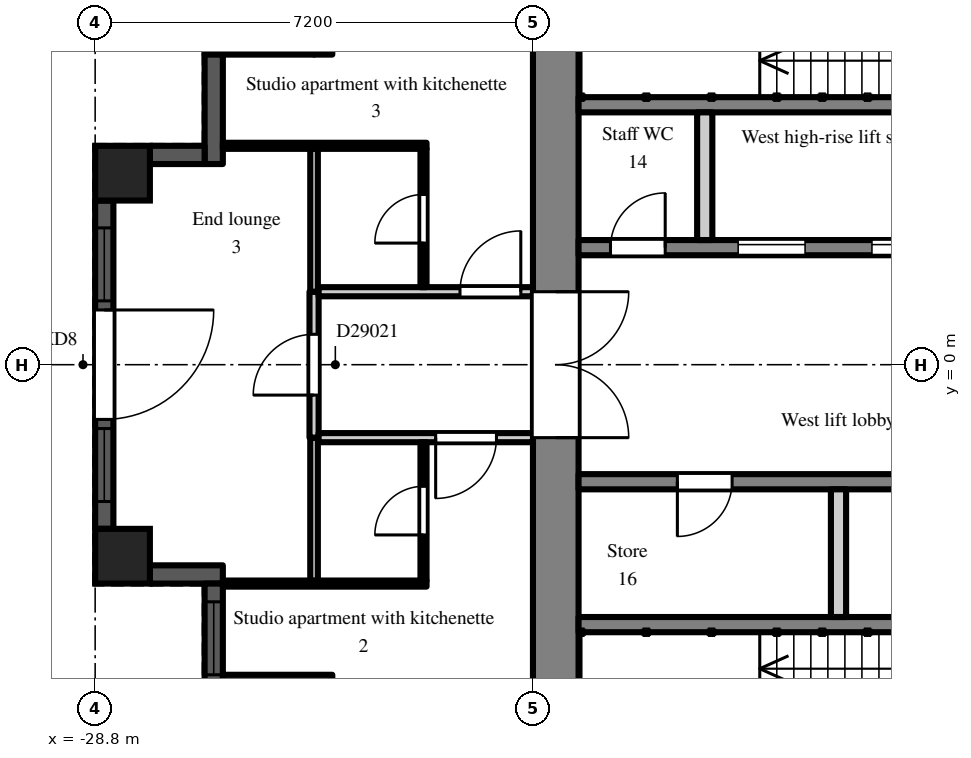
"""IFC4 building model, lengths in metres.
Left out: names, types, materials, properties, quantities, classifications, styles, units other than length and angle.
Written with IfcOpenShell. Run it as: python <this file> out.ifc"""

import sys

from ifc_helpers import new_model, si_unit, direction, frame, frame_2d, origin, origin_2d, place, context, subcontext, project, spatial, rectangle, extrude, element, fill, save


model = new_model("IFC4")
c1 = context("Model", 3, precision=1e-05, world=origin(), true_north=direction((0.0, 1.0)))
c2 = subcontext(c1, "Body", "Model", "MODEL_VIEW")
j1 = project(units=[si_unit("LENGTHUNIT", "METRE"), si_unit("PLANEANGLEUNIT", "RADIAN")], contexts=[c1])
p1 = place(None, origin())
s1 = spatial("IfcSite", under=j1, at=p1, CompositionType="ELEMENT")
p2 = place(p1, origin())
s2 = spatial("IfcBuilding", under=s1, at=p2, CompositionType="ELEMENT")
p3 = place(p2, frame((0.0, 0.0, 198.9)))
s3 = spatial("IfcBuildingStorey", under=s2, at=p3, CompositionType="ELEMENT", Elevation=198.9)
for number, where, z_axis, x_axis in (
    (1, (-28.35, -3.15, 0.0), (0.0, 0.0, 1.0), (1.0, 0.0, 0.0)),
    (2, (-28.35, 3.15, 0.0), (0.0, 0.0, 1.0), (1.0, 0.0, 0.0)),
):
    element("IfcColumn", number, at=place(p3, frame(where, z_axis=z_axis, x_axis=x_axis)), inside=s3, PredefinedType="COLUMN", context=c2, shape_type="SweptSolid", body=[
        extrude(rectangle(XDim=0.9, YDim=0.9, at=origin_2d()), origin(), (0.0, 0.0, 1.0), 3.0),
    ])
p4 = place(p3, frame((-25.05, 6.3, 0.0), z_axis=(0.0, 0.0, 1.0), x_axis=(0.0, -1.0, 0.0)))
e3 = element("IfcWall", 3, at=p4, inside=s3, PredefinedType="SOLIDWALL", context=c2, shape_type="SweptSolid", body=[
    extrude(rectangle(XDim=1.2, YDim=0.3, at=frame_2d((0.6, 0.0))), origin(), (0.0, 0.0, 1.0), 2.6),
])
p5 = place(p3, frame((-25.2, 5.25, 0.0), z_axis=(0.0, 0.0, 1.0), x_axis=(-1.0, 0.0, 0.0)))
e4 = element("IfcWall", 4, at=p5, inside=s3, PredefinedType="SOLIDWALL", context=c2, shape_type="SweptSolid", body=[
    extrude(rectangle(XDim=1.8, YDim=0.3, at=frame_2d((0.9, 0.0))), origin(), (0.0, 0.0, 1.0), 2.6),
])
p6 = place(p5, frame((0.3, 0.0, 0.2)))
e5 = element("IfcOpeningElement", 5, at=p6, cuts=e4, PredefinedType="OPENING", context=c2, shape_type="SweptSolid", body=[
    extrude(rectangle(XDim=1.2, YDim=1.85, at=frame_2d((0.6, 0.925))), frame((0.0, 0.16, 0.0), z_axis=(0.0, -1.0, 0.0), x_axis=(1.0, 0.0, 0.0)), (0.0, 0.0, 1.0), 0.32),
])
p7 = place(p3, frame((-26.85, 5.1, 0.0), z_axis=(0.0, 0.0, 1.0), x_axis=(0.0, -1.0, 0.0)))
e6 = element("IfcWall", 6, at=p7, inside=s3, PredefinedType="SOLIDWALL", context=c2, shape_type="SweptSolid", body=[
    extrude(rectangle(XDim=1.8, YDim=0.3, at=frame_2d((0.9, 0.0))), origin(), (0.0, 0.0, 1.0), 2.6),
])
p8 = place(p3, frame((-27.0, 3.45, 0.0), z_axis=(0.0, 0.0, 1.0), x_axis=(-1.0, 0.0, 0.0)))
e7 = element("IfcWall", 7, at=p8, inside=s3, PredefinedType="SOLIDWALL", context=c2, shape_type="SweptSolid", body=[
    extrude(rectangle(XDim=0.9, YDim=0.3, at=frame_2d((0.45, 0.0))), origin(), (0.0, 0.0, 1.0), 2.6),
])
p9 = place(p3, frame((-28.65, 2.7, 0.0), z_axis=(0.0, 0.0, 1.0), x_axis=(0.0, -1.0, 0.0)))
e8 = element("IfcWall", 8, at=p9, inside=s3, PredefinedType="SOLIDWALL", context=c2, shape_type="SweptSolid", body=[
    extrude(rectangle(XDim=5.4, YDim=0.3, at=frame_2d((2.7, 0.0))), origin(), (0.0, 0.0, 1.0), 2.3),
])
p10 = place(p9, frame((1.8, 0.0, 0.0)))
e9 = element("IfcOpeningElement", 9, at=p10, cuts=e8, PredefinedType="OPENING", context=c2, shape_type="SweptSolid", body=[
    extrude(rectangle(XDim=1.8, YDim=2.05, at=frame_2d((0.9, 1.025))), frame((0.0, 0.16, 0.0), z_axis=(0.0, -1.0, 0.0), x_axis=(1.0, 0.0, 0.0)), (0.0, 0.0, 1.0), 0.32),
])
p11 = place(p9, frame((0.45, 0.0, 0.2)))
e10 = element("IfcOpeningElement", 10, at=p11, cuts=e8, PredefinedType="OPENING", context=c2, shape_type="SweptSolid", body=[
    extrude(rectangle(XDim=1.2, YDim=1.85, at=frame_2d((0.6, 0.925))), frame((0.0, 0.16, 0.0), z_axis=(0.0, -1.0, 0.0), x_axis=(1.0, 0.0, 0.0)), (0.0, 0.0, 1.0), 0.32),
])
p12 = place(p9, frame((3.75, 0.0, 0.2)))
e11 = element("IfcOpeningElement", 11, at=p12, cuts=e8, PredefinedType="OPENING", context=c2, shape_type="SweptSolid", body=[
    extrude(rectangle(XDim=1.2, YDim=1.85, at=frame_2d((0.6, 0.925))), frame((0.0, 0.16, 0.0), z_axis=(0.0, -1.0, 0.0), x_axis=(1.0, 0.0, 0.0)), (0.0, 0.0, 1.0), 0.32),
])
p13 = place(p3, frame((-27.9, -3.45, 0.0), z_axis=(0.0, 0.0, 1.0), x_axis=(1.0, 0.0, 0.0)))
e12 = element("IfcWall", 12, at=p13, inside=s3, PredefinedType="SOLIDWALL", context=c2, shape_type="SweptSolid", body=[
    extrude(rectangle(XDim=1.2, YDim=0.3, at=frame_2d((0.6, 0.0))), origin(), (0.0, 0.0, 1.0), 2.6),
])
p14 = place(p3, frame((-26.85, -3.6, 0.0), z_axis=(0.0, 0.0, 1.0), x_axis=(0.0, -1.0, 0.0)))
e13 = element("IfcWall", 13, at=p14, inside=s3, PredefinedType="SOLIDWALL", context=c2, shape_type="SweptSolid", body=[
    extrude(rectangle(XDim=1.8, YDim=0.3, at=frame_2d((0.9, 0.0))), origin(), (0.0, 0.0, 1.0), 2.6),
])
p15 = place(p14, frame((0.3, 0.0, 0.2)))
e14 = element("IfcOpeningElement", 14, at=p15, cuts=e13, PredefinedType="OPENING", context=c2, shape_type="SweptSolid", body=[
    extrude(rectangle(XDim=1.2, YDim=1.85, at=frame_2d((0.6, 0.925))), frame((0.0, 0.16, 0.0), z_axis=(0.0, -1.0, 0.0), x_axis=(1.0, 0.0, 0.0)), (0.0, 0.0, 1.0), 0.32),
])
p16 = place(p3, frame((-26.7, -5.25, 0.0), z_axis=(0.0, 0.0, 1.0), x_axis=(1.0, 0.0, 0.0)))
e15 = element("IfcWall", 15, at=p16, inside=s3, PredefinedType="SOLIDWALL", context=c2, shape_type="SweptSolid", body=[
    extrude(rectangle(XDim=1.8, YDim=0.3, at=frame_2d((0.9, 0.0))), origin(), (0.0, 0.0, 1.0), 2.6),
])
p17 = place(p3, frame((-21.225, -7.2, 0.0), z_axis=(0.0, 0.0, 1.0), x_axis=(0.0, 1.0, 0.0)))
e16 = element("IfcWall", 16, at=p17, inside=s3, PredefinedType="SHEAR", context=c2, shape_type="SweptSolid", body=[
    extrude(rectangle(XDim=14.4, YDim=0.75, at=frame_2d((7.2, 0.0))), origin(), (0.0, 0.0, 1.0), 2.6),
])
p18 = place(p17, frame((6.0, 0.0, 0.0)))
e17 = element("IfcOpeningElement", 17, at=p18, cuts=e16, PredefinedType="OPENING", context=c2, shape_type="SweptSolid", body=[
    extrude(rectangle(XDim=2.4, YDim=2.2, at=frame_2d((1.2, 1.1))), frame((0.0, 0.385, 0.0), z_axis=(0.0, -1.0, 0.0), x_axis=(1.0, 0.0, 0.0)), (0.0, 0.0, 1.0), 0.77),
])
p19 = place(p3, frame((-7.9, 1.925, 0.0), z_axis=(0.0, 0.0, 1.0), x_axis=(-1.0, 0.0, 0.0)))
e18 = element("IfcWall", 18, at=p19, inside=s3, PredefinedType="SHEAR", context=c2, shape_type="SweptSolid", body=[
    extrude(rectangle(XDim=12.95, YDim=0.25, at=frame_2d((6.475, 0.0))), origin(), (0.0, 0.0, 1.0), 2.6),
])
p20 = place(p19, frame((4.825, 0.0, 0.0)))
e19 = element("IfcOpeningElement", 19, at=p20, cuts=e18, PredefinedType="OPENING", context=c2, shape_type="SweptSolid", body=[
    extrude(rectangle(XDim=1.1, YDim=2.1, at=frame_2d((0.55, 1.05))), frame((0.0, 0.135, 0.0), z_axis=(0.0, -1.0, 0.0), x_axis=(1.0, 0.0, 0.0)), (0.0, 0.0, 1.0), 0.27),
])
p21 = place(p19, frame((7.025, 0.0, 0.0)))
e20 = element("IfcOpeningElement", 20, at=p21, cuts=e18, PredefinedType="OPENING", context=c2, shape_type="SweptSolid", body=[
    extrude(rectangle(XDim=1.1, YDim=2.1, at=frame_2d((0.55, 1.05))), frame((0.0, 0.135, 0.0), z_axis=(0.0, -1.0, 0.0), x_axis=(1.0, 0.0, 0.0)), (0.0, 0.0, 1.0), 0.27),
])
p22 = place(p19, frame((9.225, 0.0, 0.0)))
e21 = element("IfcOpeningElement", 21, at=p22, cuts=e18, PredefinedType="OPENING", context=c2, shape_type="SweptSolid", body=[
    extrude(rectangle(XDim=1.1, YDim=2.1, at=frame_2d((0.55, 1.05))), frame((0.0, 0.135, 0.0), z_axis=(0.0, -1.0, 0.0), x_axis=(1.0, 0.0, 0.0)), (0.0, 0.0, 1.0), 0.27),
])
p23 = place(p19, frame((0.525, 0.0, 0.0)))
e22 = element("IfcOpeningElement", 22, at=p23, cuts=e18, PredefinedType="OPENING", context=c2, shape_type="SweptSolid", body=[
    extrude(rectangle(XDim=0.9, YDim=2.1, at=frame_2d((0.45, 1.05))), frame((0.0, 0.135, 0.0), z_axis=(0.0, -1.0, 0.0), x_axis=(1.0, 0.0, 0.0)), (0.0, 0.0, 1.0), 0.27),
])
p24 = place(p19, frame((2.625, 0.0, 0.0)))
e23 = element("IfcOpeningElement", 23, at=p24, cuts=e18, PredefinedType="OPENING", context=c2, shape_type="SweptSolid", body=[
    extrude(rectangle(XDim=1.1, YDim=2.1, at=frame_2d((0.55, 1.05))), frame((0.0, 0.135, 0.0), z_axis=(0.0, -1.0, 0.0), x_axis=(1.0, 0.0, 0.0)), (0.0, 0.0, 1.0), 0.27),
])
p25 = place(p19, frame((11.525, 0.0, 0.0)))
e24 = element("IfcOpeningElement", 24, at=p25, cuts=e18, PredefinedType="OPENING", context=c2, shape_type="SweptSolid", body=[
    extrude(rectangle(XDim=0.9, YDim=2.1, at=frame_2d((0.45, 1.05))), frame((0.0, 0.135, 0.0), z_axis=(0.0, -1.0, 0.0), x_axis=(1.0, 0.0, 0.0)), (0.0, 0.0, 1.0), 0.27),
])
p26 = place(p3, frame((-12.3, 4.275, 0.0), z_axis=(0.0, 0.0, 1.0), x_axis=(-1.0, 0.0, 0.0)))
e25 = element("IfcWall", 25, at=p26, inside=s3, PredefinedType="SHEAR", context=c2, shape_type="SweptSolid", body=[
    extrude(rectangle(XDim=8.55, YDim=0.25, at=frame_2d((4.275, 0.0))), origin(), (0.0, 0.0, 1.0), 2.6),
])
p27 = place(p3, frame((-18.775, 2.05, 0.0), z_axis=(0.0, 0.0, 1.0), x_axis=(0.0, 1.0, 0.0)))
e26 = element("IfcWall", 26, at=p27, inside=s3, PredefinedType="PARTITIONING", context=c2, shape_type="SweptSolid", body=[
    extrude(rectangle(XDim=2.1, YDim=0.25, at=frame_2d((1.05, 0.0))), origin(), (0.0, 0.0, 1.0), 2.6),
])
p28 = place(p3, frame((-7.9, -1.925, 0.0), z_axis=(0.0, 0.0, 1.0), x_axis=(-1.0, 0.0, 0.0)))
e27 = element("IfcWall", 27, at=p28, inside=s3, PredefinedType="SHEAR", context=c2, shape_type="SweptSolid", body=[
    extrude(rectangle(XDim=12.95, YDim=0.25, at=frame_2d((6.475, 0.0))), origin(), (0.0, 0.0, 1.0), 2.6),
])
p29 = place(p28, frame((0.525, 0.0, 0.0)))
e28 = element("IfcOpeningElement", 28, at=p29, cuts=e27, PredefinedType="OPENING", context=c2, shape_type="SweptSolid", body=[
    extrude(rectangle(XDim=0.9, YDim=2.1, at=frame_2d((0.45, 1.05))), frame((0.0, 0.135, 0.0), z_axis=(0.0, -1.0, 0.0), x_axis=(1.0, 0.0, 0.0)), (0.0, 0.0, 1.0), 0.27),
])
p30 = place(p28, frame((2.625, 0.0, 0.0)))
e29 = element("IfcOpeningElement", 29, at=p30, cuts=e27, PredefinedType="OPENING", context=c2, shape_type="SweptSolid", body=[
    extrude(rectangle(XDim=1.1, YDim=2.1, at=frame_2d((0.55, 1.05))), frame((0.0, 0.135, 0.0), z_axis=(0.0, -1.0, 0.0), x_axis=(1.0, 0.0, 0.0)), (0.0, 0.0, 1.0), 0.27),
])
p31 = place(p28, frame((6.025, 0.0, 0.0)))
e30 = element("IfcOpeningElement", 30, at=p31, cuts=e27, PredefinedType="OPENING", context=c2, shape_type="SweptSolid", body=[
    extrude(rectangle(XDim=0.9, YDim=2.1, at=frame_2d((0.45, 1.05))), frame((0.0, 0.135, 0.0), z_axis=(0.0, -1.0, 0.0), x_axis=(1.0, 0.0, 0.0)), (0.0, 0.0, 1.0), 0.27),
])
p32 = place(p28, frame((10.425, 0.0, 0.0)))
e31 = element("IfcOpeningElement", 31, at=p32, cuts=e27, PredefinedType="OPENING", context=c2, shape_type="SweptSolid", body=[
    extrude(rectangle(XDim=0.9, YDim=2.1, at=frame_2d((0.45, 1.05))), frame((0.0, 0.135, 0.0), z_axis=(0.0, -1.0, 0.0), x_axis=(1.0, 0.0, 0.0)), (0.0, 0.0, 1.0), 0.27),
])
p33 = place(p3, frame((-12.3, -4.275, 0.0), z_axis=(0.0, 0.0, 1.0), x_axis=(-1.0, 0.0, 0.0)))
e32 = element("IfcWall", 32, at=p33, inside=s3, PredefinedType="SHEAR", context=c2, shape_type="SweptSolid", body=[
    extrude(rectangle(XDim=8.55, YDim=0.25, at=frame_2d((4.275, 0.0))), origin(), (0.0, 0.0, 1.0), 2.6),
])
p34 = place(p3, frame((-16.575, -2.05, 0.0), z_axis=(0.0, 0.0, 1.0), x_axis=(0.0, -1.0, 0.0)))
e33 = element("IfcWall", 33, at=p34, inside=s3, PredefinedType="PARTITIONING", context=c2, shape_type="SweptSolid", body=[
    extrude(rectangle(XDim=2.1, YDim=0.25, at=frame_2d((1.05, 0.0))), origin(), (0.0, 0.0, 1.0), 2.6),
])
for number, where, z_axis, x_axis in (
    (34, (-26.7, -3.6, 0.0), (0.0, 0.0, 1.0), (1.0, 0.0, 0.0)),
    (35, (-26.7, 3.6, 0.0), (0.0, 0.0, 1.0), (1.0, 0.0, 0.0)),
):
    element("IfcWall", number, at=place(p3, frame(where, z_axis=z_axis, x_axis=x_axis)), inside=s3, PredefinedType="PARTITIONING", context=c2, shape_type="SweptSolid", body=[
        extrude(rectangle(XDim=3.35, YDim=0.1, at=frame_2d((1.675, 0.0))), origin(), (0.0, 0.0, 1.0), 2.6),
    ])
p35 = place(p3, frame((-25.2, -3.55, 0.0), z_axis=(0.0, 0.0, 1.0), x_axis=(0.0, 1.0, 0.0)))
e36 = element("IfcWall", 36, at=p35, inside=s3, PredefinedType="PARTITIONING", context=c2, shape_type="SweptSolid", body=[
    extrude(rectangle(XDim=2.35, YDim=0.125, at=frame_2d((1.175, 0.0))), origin(), (0.0, 0.0, 1.0), 2.6),
])
p36 = place(p3, frame((-25.2, -1.2, 0.0), z_axis=(0.0, 0.0, 1.0), x_axis=(0.0, 1.0, 0.0)))
e37 = element("IfcWall", 37, at=p36, inside=s3, PredefinedType="PARTITIONING", context=c2, shape_type="SweptSolid", body=[
    extrude(rectangle(XDim=2.4, YDim=0.15, at=frame_2d((1.2, 0.0))), origin(), (0.0, 0.0, 1.0), 2.6),
])
p37 = place(p36, frame((0.7, 0.0, 0.0)))
e38 = element("IfcOpeningElement", 38, at=p37, cuts=e37, PredefinedType="OPENING", context=c2, shape_type="SweptSolid", body=[
    extrude(rectangle(XDim=1.0, YDim=2.1, at=frame_2d((0.5, 1.05))), frame((0.0, 0.085, 0.0), z_axis=(0.0, -1.0, 0.0), x_axis=(1.0, 0.0, 0.0)), (0.0, 0.0, 1.0), 0.17),
])
p38 = place(p3, frame((-25.125, -1.2, 0.0), z_axis=(0.0, 0.0, 1.0), x_axis=(1.0, 0.0, 0.0)))
e39 = element("IfcWall", 39, at=p38, inside=s3, PredefinedType="PARTITIONING", context=c2, shape_type="SweptSolid", body=[
    extrude(rectangle(XDim=3.525, YDim=0.15, at=frame_2d((1.762, 0.0))), origin(), (0.0, 0.0, 1.0), 2.6),
])
p39 = place(p38, frame((1.925, 0.0, 0.0)))
e40 = element("IfcOpeningElement", 40, at=p39, cuts=e39, PredefinedType="OPENING", context=c2, shape_type="SweptSolid", body=[
    extrude(rectangle(XDim=1.0, YDim=2.1, at=frame_2d((0.5, 1.05))), frame((0.0, 0.085, 0.0), z_axis=(0.0, -1.0, 0.0), x_axis=(1.0, 0.0, 0.0)), (0.0, 0.0, 1.0), 0.17),
])
p40 = place(p3, frame((-25.2, 1.2, 0.0), z_axis=(0.0, 0.0, 1.0), x_axis=(0.0, 1.0, 0.0)))
e41 = element("IfcWall", 41, at=p40, inside=s3, PredefinedType="PARTITIONING", context=c2, shape_type="SweptSolid", body=[
    extrude(rectangle(XDim=2.35, YDim=0.125, at=frame_2d((1.175, 0.0))), origin(), (0.0, 0.0, 1.0), 2.6),
])
p41 = place(p3, frame((-25.125, 1.2, 0.0), z_axis=(0.0, 0.0, 1.0), x_axis=(1.0, 0.0, 0.0)))
e42 = element("IfcWall", 42, at=p41, inside=s3, PredefinedType="PARTITIONING", context=c2, shape_type="SweptSolid", body=[
    extrude(rectangle(XDim=3.525, YDim=0.15, at=frame_2d((1.762, 0.0))), origin(), (0.0, 0.0, 1.0), 2.6),
])
p42 = place(p41, frame((2.325, 0.0, 0.0)))
e43 = element("IfcOpeningElement", 43, at=p42, cuts=e42, PredefinedType="OPENING", context=c2, shape_type="SweptSolid", body=[
    extrude(rectangle(XDim=1.0, YDim=2.1, at=frame_2d((0.5, 1.05))), frame((0.0, 0.085, 0.0), z_axis=(0.0, -1.0, 0.0), x_axis=(1.0, 0.0, 0.0)), (0.0, 0.0, 1.0), 0.17),
])
p43 = place(p3, frame((-23.4, -3.55, 0.0), z_axis=(0.0, 0.0, 1.0), x_axis=(0.0, 1.0, 0.0)))
e44 = element("IfcWall", 44, at=p43, inside=s3, PredefinedType="PARTITIONING", context=c2, shape_type="SweptSolid", body=[
    extrude(rectangle(XDim=2.275, YDim=0.1, at=frame_2d((1.138, 0.0))), origin(), (0.0, 0.0, 1.0), 2.6),
])
p44 = place(p43, frame((0.75, 0.0, 0.0)))
e45 = element("IfcOpeningElement", 45, at=p44, cuts=e44, PredefinedType="OPENING", context=c2, shape_type="SweptSolid", body=[
    extrude(rectangle(XDim=0.8, YDim=2.1, at=frame_2d((0.4, 1.05))), frame((0.0, 0.06, 0.0), z_axis=(0.0, -1.0, 0.0), x_axis=(1.0, 0.0, 0.0)), (0.0, 0.0, 1.0), 0.12),
])
p45 = place(p3, frame((-23.4, 1.275, 0.0), z_axis=(0.0, 0.0, 1.0), x_axis=(0.0, 1.0, 0.0)))
e46 = element("IfcWall", 46, at=p45, inside=s3, PredefinedType="PARTITIONING", context=c2, shape_type="SweptSolid", body=[
    extrude(rectangle(XDim=2.275, YDim=0.1, at=frame_2d((1.138, 0.0))), origin(), (0.0, 0.0, 1.0), 2.6),
])
p46 = place(p45, frame((0.725, 0.0, 0.0)))
e47 = element("IfcOpeningElement", 47, at=p46, cuts=e46, PredefinedType="OPENING", context=c2, shape_type="SweptSolid", body=[
    extrude(rectangle(XDim=0.8, YDim=2.1, at=frame_2d((0.4, 1.05))), frame((0.0, 0.06, 0.0), z_axis=(0.0, -1.0, 0.0), x_axis=(1.0, 0.0, 0.0)), (0.0, 0.0, 1.0), 0.12),
])
p47 = place(p10, origin())
e48 = element("IfcDoor", 48, at=p47, inside=s3, OperationType="SINGLE_SWING_LEFT", PredefinedType="DOOR", context=c2, shape_type="SweptSolid", body=[
    extrude(rectangle(XDim=1.8, YDim=2.05, at=frame_2d((0.9, 1.025))), frame((0.0, 0.025, 0.0), z_axis=(0.0, -1.0, 0.0), x_axis=(1.0, 0.0, 0.0)), (0.0, 0.0, 1.0), 0.05),
])
fill(e9, e48)
p48 = place(p11, origin())
e49 = element("IfcWindow", 49, at=p48, inside=s3, PartitioningType="SINGLE_PANEL", PredefinedType="WINDOW", context=c2, shape_type="SweptSolid", body=[
    extrude(rectangle(XDim=1.2, YDim=1.85, at=frame_2d((0.6, 0.925))), frame((0.0, 0.03, 0.0), z_axis=(0.0, -1.0, 0.0), x_axis=(1.0, 0.0, 0.0)), (0.0, 0.0, 1.0), 0.06),
])
fill(e10, e49)
p49 = place(p12, origin())
e50 = element("IfcWindow", 50, at=p49, inside=s3, PartitioningType="SINGLE_PANEL", PredefinedType="WINDOW", context=c2, shape_type="SweptSolid", body=[
    extrude(rectangle(XDim=1.2, YDim=1.85, at=frame_2d((0.6, 0.925))), frame((0.0, 0.03, 0.0), z_axis=(0.0, -1.0, 0.0), x_axis=(1.0, 0.0, 0.0)), (0.0, 0.0, 1.0), 0.06),
])
fill(e11, e50)
p50 = place(p15, origin())
e51 = element("IfcWindow", 51, at=p50, inside=s3, PartitioningType="SINGLE_PANEL", PredefinedType="WINDOW", context=c2, shape_type="SweptSolid", body=[
    extrude(rectangle(XDim=1.2, YDim=1.85, at=frame_2d((0.6, 0.925))), frame((0.0, 0.03, 0.0), z_axis=(0.0, -1.0, 0.0), x_axis=(1.0, 0.0, 0.0)), (0.0, 0.0, 1.0), 0.06),
])
fill(e14, e51)
p51 = place(p21, origin())
e52 = element("IfcDoor", 52, at=p51, inside=s3, OperationType="SLIDING_TO_LEFT", PredefinedType="DOOR", context=c2, shape_type="SweptSolid", body=[
    extrude(rectangle(XDim=1.1, YDim=2.1, at=frame_2d((0.55, 1.05))), frame((0.0, 0.025, 0.0), z_axis=(0.0, -1.0, 0.0), x_axis=(1.0, 0.0, 0.0)), (0.0, 0.0, 1.0), 0.05),
])
fill(e20, e52)
p52 = place(p22, origin())
e53 = element("IfcDoor", 53, at=p52, inside=s3, OperationType="SLIDING_TO_LEFT", PredefinedType="DOOR", context=c2, shape_type="SweptSolid", body=[
    extrude(rectangle(XDim=1.1, YDim=2.1, at=frame_2d((0.55, 1.05))), frame((0.0, 0.025, 0.0), z_axis=(0.0, -1.0, 0.0), x_axis=(1.0, 0.0, 0.0)), (0.0, 0.0, 1.0), 0.05),
])
fill(e21, e53)
p53 = place(p18, frame((2.4, 0.0, 0.0), z_axis=(0.0, 0.0, 1.0), x_axis=(-1.0, 0.0, 0.0)))
e54 = element("IfcDoor", 54, at=p53, inside=s3, OperationType="DOUBLE_DOOR_DOUBLE_SWING", PredefinedType="DOOR", context=c2, shape_type="SweptSolid", body=[
    extrude(rectangle(XDim=2.4, YDim=2.2, at=frame_2d((1.2, 1.1))), frame((0.0, 0.025, 0.0), z_axis=(0.0, -1.0, 0.0), x_axis=(1.0, 0.0, 0.0)), (0.0, 0.0, 1.0), 0.05),
])
fill(e17, e54)
p54 = place(p25, frame((0.9, 0.0, 0.0), z_axis=(0.0, 0.0, 1.0), x_axis=(-1.0, 0.0, 0.0)))
e55 = element("IfcDoor", 55, at=p54, inside=s3, OperationType="SINGLE_SWING_RIGHT", PredefinedType="DOOR", context=c2, shape_type="SweptSolid", body=[
    extrude(rectangle(XDim=0.9, YDim=2.1, at=frame_2d((0.45, 1.05))), frame((0.0, 0.025, 0.0), z_axis=(0.0, -1.0, 0.0), x_axis=(1.0, 0.0, 0.0)), (0.0, 0.0, 1.0), 0.05),
])
fill(e24, e55)
p55 = place(p32, origin())
e56 = element("IfcDoor", 56, at=p55, inside=s3, OperationType="SINGLE_SWING_RIGHT", PredefinedType="DOOR", context=c2, shape_type="SweptSolid", body=[
    extrude(rectangle(XDim=0.9, YDim=2.1, at=frame_2d((0.45, 1.05))), frame((0.0, 0.025, 0.0), z_axis=(0.0, -1.0, 0.0), x_axis=(1.0, 0.0, 0.0)), (0.0, 0.0, 1.0), 0.05),
])
fill(e31, e56)
p56 = place(p37, origin())
e57 = element("IfcDoor", 57, at=p56, inside=s3, OperationType="SINGLE_SWING_LEFT", PredefinedType="DOOR", context=c2, shape_type="SweptSolid", body=[
    extrude(rectangle(XDim=1.0, YDim=2.1, at=frame_2d((0.5, 1.05))), frame((0.0, 0.025, 0.0), z_axis=(0.0, -1.0, 0.0), x_axis=(1.0, 0.0, 0.0)), (0.0, 0.0, 1.0), 0.05),
])
fill(e38, e57)
p57 = place(p44, origin())
e58 = element("IfcDoor", 58, at=p57, inside=s3, OperationType="SINGLE_SWING_LEFT", PredefinedType="DOOR", context=c2, shape_type="SweptSolid", body=[
    extrude(rectangle(XDim=0.8, YDim=2.1, at=frame_2d((0.4, 1.05))), frame((0.0, 0.025, 0.0), z_axis=(0.0, -1.0, 0.0), x_axis=(1.0, 0.0, 0.0)), (0.0, 0.0, 1.0), 0.05),
])
fill(e45, e58)
p58 = place(p39, frame((1.0, 0.0, 0.0), z_axis=(0.0, 0.0, 1.0), x_axis=(-1.0, 0.0, 0.0)))
e59 = element("IfcDoor", 59, at=p58, inside=s3, OperationType="SINGLE_SWING_RIGHT", PredefinedType="DOOR", context=c2, shape_type="SweptSolid", body=[
    extrude(rectangle(XDim=1.0, YDim=2.1, at=frame_2d((0.5, 1.05))), frame((0.0, 0.025, 0.0), z_axis=(0.0, -1.0, 0.0), x_axis=(1.0, 0.0, 0.0)), (0.0, 0.0, 1.0), 0.05),
])
fill(e40, e59)
p59 = place(p46, origin())
e60 = element("IfcDoor", 60, at=p59, inside=s3, OperationType="SINGLE_SWING_LEFT", PredefinedType="DOOR", context=c2, shape_type="SweptSolid", body=[
    extrude(rectangle(XDim=0.8, YDim=2.1, at=frame_2d((0.4, 1.05))), frame((0.0, 0.025, 0.0), z_axis=(0.0, -1.0, 0.0), x_axis=(1.0, 0.0, 0.0)), (0.0, 0.0, 1.0), 0.05),
])
fill(e47, e60)
p60 = place(p42, origin())
e61 = element("IfcDoor", 61, at=p60, inside=s3, OperationType="SINGLE_SWING_RIGHT", PredefinedType="DOOR", context=c2, shape_type="SweptSolid", body=[
    extrude(rectangle(XDim=1.0, YDim=2.1, at=frame_2d((0.5, 1.05))), frame((0.0, 0.025, 0.0), z_axis=(0.0, -1.0, 0.0), x_axis=(1.0, 0.0, 0.0)), (0.0, 0.0, 1.0), 0.05),
])
fill(e43, e61)
save(model, sys.argv[1])
